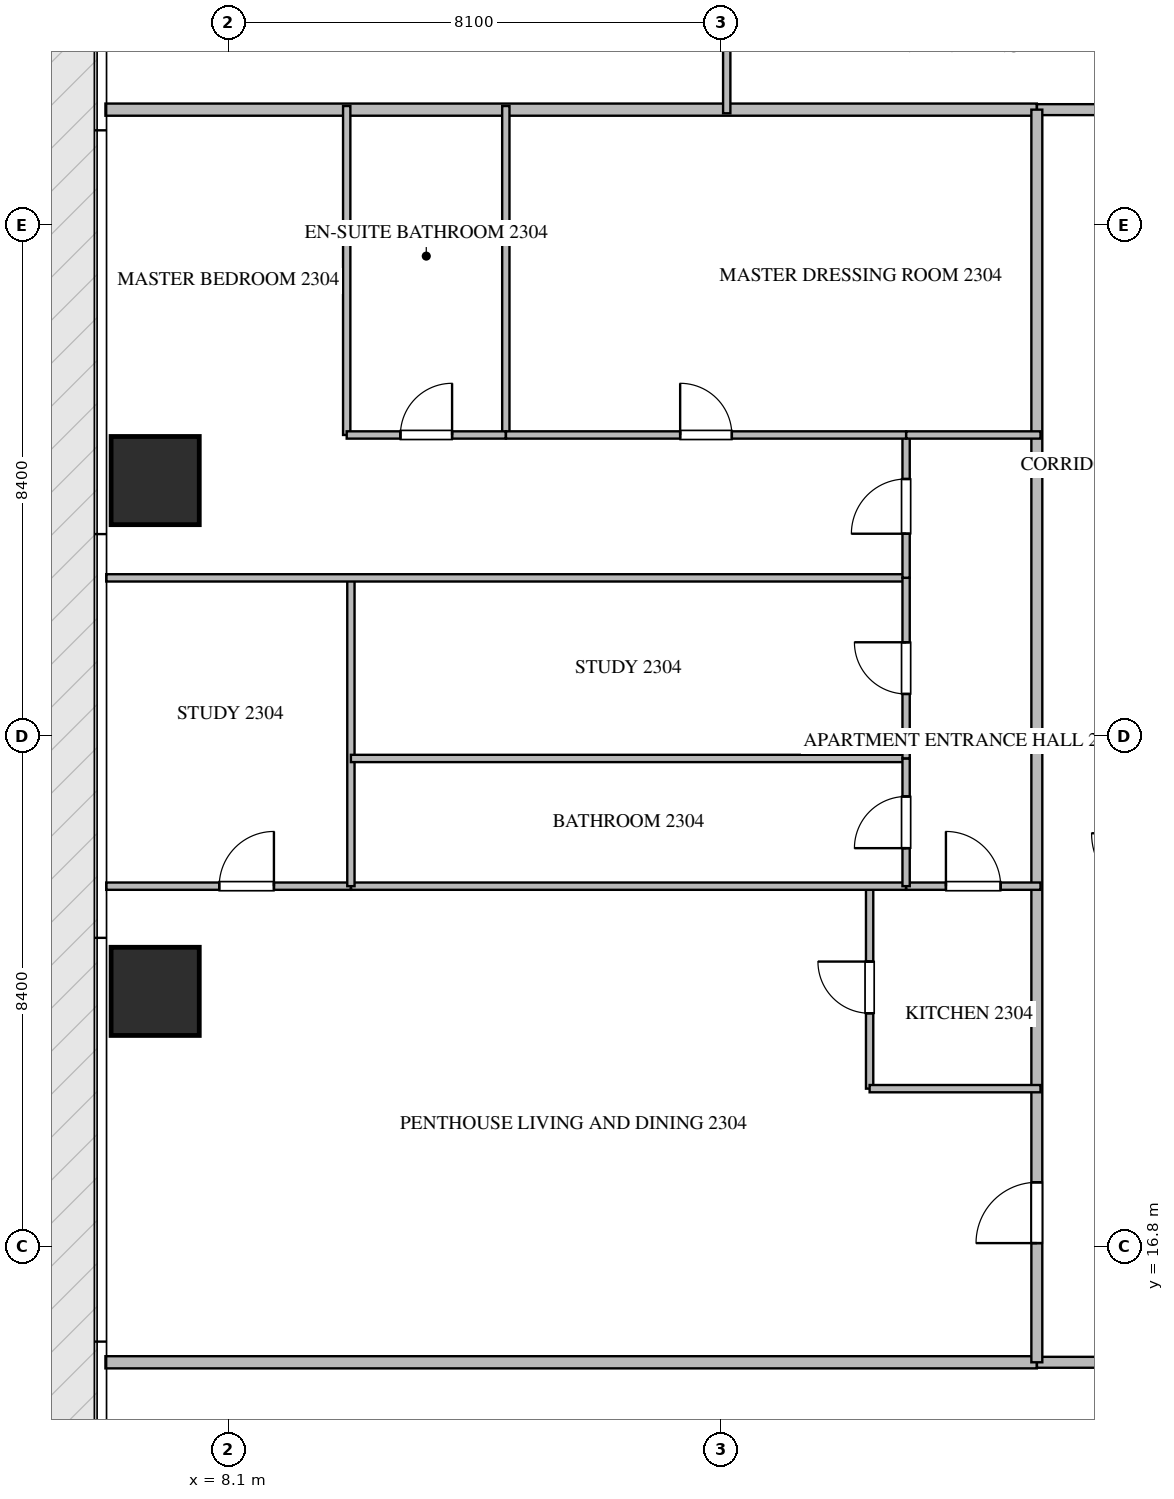
"""IFC4 building model, lengths in metres.
Left out: names, types, materials, properties, quantities, classifications, styles, units other than length and angle.
Written with IfcOpenShell. Run it as: python <this file> out.ifc"""

import sys

from ifc_helpers import new_model, si_unit, direction, frame, frame_2d, origin, origin_2d, place, context, subcontext, project, spatial, rectangle, extrude, source, transform, mapped, element, fill, save


model = new_model("IFC4")
c1 = context("Model", 3, precision=1e-05, world=origin(), true_north=direction((0.0, 1.0)))
c2 = subcontext(c1, "Body", "Model", "MODEL_VIEW")
j1 = project(units=[si_unit("LENGTHUNIT", "METRE"), si_unit("PLANEANGLEUNIT", "RADIAN")], contexts=[c1])
p1 = place(None, origin())
s1 = spatial("IfcSite", under=j1, at=p1, CompositionType="ELEMENT")
p2 = place(p1, origin())
s2 = spatial("IfcBuilding", under=s1, at=p2, CompositionType="ELEMENT")
p3 = place(p2, frame((0.0, 0.0, 94.2)))
s3 = spatial("IfcBuildingStorey", under=s2, at=p3, CompositionType="ELEMENT", Elevation=94.2)
m1 = source(origin(), c2, "Body", "SweptSolid", [
    extrude(rectangle(XDim=1.45, YDim=1.45, at=origin_2d()), origin(), (0.0, 0.0, 1.0), 3.75),
])
for number, where, z_axis, x_axis in (
    (1, (6.9, 21.0, -0.26), (0.0, 0.0, 1.0), (1.0, 0.0, 0.0)),
    (2, (6.9, 29.4, -0.26), (0.0, 0.0, 1.0), (1.0, 0.0, 0.0)),
):
    element("IfcColumn", number, at=place(p3, frame(where, z_axis=z_axis, x_axis=x_axis)), inside=s3, PredefinedType="COLUMN", context=c2, shape_type="MappedRepresentation", body=[
        mapped(m1, transform((0.0, 0.0, 0.0), scale=1.0)),
    ])
for number, where, z_axis, x_axis in (
    (3, (6.082, 14.9, 0.0), (0.0, 0.0, 1.0), (1.0, 0.0, 0.0)),
    (4, (6.082, 35.5, 0.0), (0.0, 0.0, 1.0), (1.0, 0.0, 0.0)),
):
    element("IfcWall", number, at=place(p3, frame(where, z_axis=z_axis, x_axis=x_axis)), inside=s3, PredefinedType="PARTITIONING", context=c2, shape_type="SweptSolid", body=[
        extrude(rectangle(XDim=15.318, YDim=0.2, at=frame_2d((7.659, 0.0))), origin(), (0.0, 0.0, 1.0), 3.49),
    ])
p4 = place(p3, frame((21.402, 14.9, 0.0), z_axis=(0.0, 0.0, 1.0), x_axis=(1.0, 0.0, 0.0)))
e5 = element("IfcWall", 5, at=p4, inside=s3, PredefinedType="PARTITIONING", context=c2, shape_type="SweptSolid", body=[
    extrude(rectangle(XDim=21.996, YDim=0.18, at=frame_2d((10.998, 0.0))), origin(), (0.0, 0.0, 1.0), 3.49),
])
p5 = place(p4, frame((15.222, 0.0, 0.0)))
e6 = element("IfcOpeningElement", 6, at=p5, cuts=e5, PredefinedType="OPENING", context=c2, shape_type="SweptSolid", body=[
    extrude(rectangle(XDim=1.0, YDim=2.15, at=frame_2d((0.5, 1.075))), frame((0.0, 0.1, 0.0), z_axis=(0.0, -1.0, 0.0), x_axis=(1.0, 0.0, 0.0)), (0.0, 0.0, 1.0), 0.2),
])
p6 = place(p3, frame((21.402, 35.5, 0.0), z_axis=(0.0, 0.0, 1.0), x_axis=(1.0, 0.0, 0.0)))
e7 = element("IfcWall", 7, at=p6, inside=s3, PredefinedType="PARTITIONING", context=c2, shape_type="SweptSolid", body=[
    extrude(rectangle(XDim=21.996, YDim=0.18, at=frame_2d((10.998, 0.0))), origin(), (0.0, 0.0, 1.0), 3.49),
])
p7 = place(p6, frame((7.454, 0.0, 0.0)))
e8 = element("IfcOpeningElement", 8, at=p7, cuts=e7, PredefinedType="OPENING", context=c2, shape_type="SweptSolid", body=[
    extrude(rectangle(XDim=1.0, YDim=2.15, at=frame_2d((0.5, 1.075))), frame((0.0, 0.1, 0.0), z_axis=(0.0, -1.0, 0.0), x_axis=(1.0, 0.0, 0.0)), (0.0, 0.0, 1.0), 0.2),
])
p8 = place(p6, frame((13.542, 0.0, 0.0)))
e9 = element("IfcOpeningElement", 9, at=p8, cuts=e7, PredefinedType="OPENING", context=c2, shape_type="SweptSolid", body=[
    extrude(rectangle(XDim=1.0, YDim=2.15, at=frame_2d((0.5, 1.075))), frame((0.0, 0.1, 0.0), z_axis=(0.0, -1.0, 0.0), x_axis=(1.0, 0.0, 0.0)), (0.0, 0.0, 1.0), 0.2),
])
p9 = place(p3, frame((21.4, 14.9, 0.0), z_axis=(0.0, 0.0, 1.0), x_axis=(0.0, 1.0, 0.0)))
e10 = element("IfcWall", 10, at=p9, inside=s3, PredefinedType="PARTITIONING", context=c2, shape_type="SweptSolid", body=[
    extrude(rectangle(XDim=20.6, YDim=0.18, at=frame_2d((10.3, 0.0))), origin(), (0.0, 0.0, 1.0), 3.49),
])
p10 = place(p9, frame((1.96, 0.0, 0.0)))
e11 = element("IfcOpeningElement", 11, at=p10, cuts=e10, PredefinedType="OPENING", context=c2, shape_type="SweptSolid", body=[
    extrude(rectangle(XDim=1.0, YDim=2.15, at=frame_2d((0.5, 1.075))), frame((0.0, 0.1, 0.0), z_axis=(0.0, -1.0, 0.0), x_axis=(1.0, 0.0, 0.0)), (0.0, 0.0, 1.0), 0.2),
])
p11 = place(p3, frame((16.3, 37.648, 0.0), z_axis=(0.0, 0.0, 1.0), x_axis=(0.0, -1.0, 0.0)))
e12 = element("IfcWall", 12, at=p11, inside=s3, PredefinedType="PARTITIONING", context=c2, shape_type="SweptSolid", body=[
    extrude(rectangle(XDim=2.208, YDim=0.12, at=frame_2d((1.104, 0.0))), origin(), (0.0, 0.0, 1.0), 3.49),
])
p12 = place(p3, frame((18.65, 19.4, 0.0), z_axis=(0.0, 0.0, 1.0), x_axis=(0.0, 1.0, 0.0)))
e13 = element("IfcWall", 13, at=p12, inside=s3, PredefinedType="PARTITIONING", context=c2, shape_type="SweptSolid", body=[
    extrude(rectangle(XDim=3.33, YDim=0.12, at=frame_2d((1.665, 0.0))), origin(), (0.0, 0.0, 1.0), 3.49),
])
p13 = place(p12, frame((1.24, 0.0, 0.0)))
e14 = element("IfcOpeningElement", 14, at=p13, cuts=e13, PredefinedType="OPENING", context=c2, shape_type="SweptSolid", body=[
    extrude(rectangle(XDim=0.85, YDim=2.1, at=frame_2d((0.425, 1.05))), frame((0.0, 0.07, 0.0), z_axis=(0.0, -1.0, 0.0), x_axis=(1.0, 0.0, 0.0)), (0.0, 0.0, 1.0), 0.14),
])
p14 = place(p3, frame((18.65, 19.4, 0.0), z_axis=(0.0, 0.0, 1.0), x_axis=(1.0, 0.0, 0.0)))
e15 = element("IfcWall", 15, at=p14, inside=s3, PredefinedType="PARTITIONING", context=c2, shape_type="SweptSolid", body=[
    extrude(rectangle(XDim=2.81, YDim=0.12, at=frame_2d((1.405, 0.0))), origin(), (0.0, 0.0, 1.0), 3.49),
])
p15 = place(p3, frame((19.25, 22.73, 0.0), z_axis=(0.0, 0.0, 1.0), x_axis=(1.0, 0.0, 0.0)))
e16 = element("IfcWall", 16, at=p15, inside=s3, PredefinedType="PARTITIONING", context=c2, shape_type="SweptSolid", body=[
    extrude(rectangle(XDim=2.21, YDim=0.12, at=frame_2d((1.105, 0.0))), origin(), (0.0, 0.0, 1.0), 3.49),
])
p16 = place(p15, frame((0.655, 0.0, 0.0)))
e17 = element("IfcOpeningElement", 17, at=p16, cuts=e16, PredefinedType="OPENING", context=c2, shape_type="SweptSolid", body=[
    extrude(rectangle(XDim=0.9, YDim=2.1, at=frame_2d((0.45, 1.05))), frame((0.0, 0.07, 0.0), z_axis=(0.0, -1.0, 0.0), x_axis=(1.0, 0.0, 0.0)), (0.0, 0.0, 1.0), 0.14),
])
p17 = place(p3, frame((6.095, 22.73, 0.0), z_axis=(0.0, 0.0, 1.0), x_axis=(1.0, 0.0, 0.0)))
e18 = element("IfcWall", 18, at=p17, inside=s3, PredefinedType="PARTITIONING", context=c2, shape_type="SweptSolid", body=[
    extrude(rectangle(XDim=4.024, YDim=0.12, at=frame_2d((2.012, 0.0))), origin(), (0.0, 0.0, 1.0), 3.49),
])
p18 = place(p17, frame((1.858, 0.0, 0.0)))
e19 = element("IfcOpeningElement", 19, at=p18, cuts=e18, PredefinedType="OPENING", context=c2, shape_type="SweptSolid", body=[
    extrude(rectangle(XDim=0.9, YDim=2.1, at=frame_2d((0.45, 1.05))), frame((0.0, 0.07, 0.0), z_axis=(0.0, -1.0, 0.0), x_axis=(1.0, 0.0, 0.0)), (0.0, 0.0, 1.0), 0.14),
])
p19 = place(p3, frame((10.121, 22.73, 0.0), z_axis=(0.0, 0.0, 1.0), x_axis=(1.0, 0.0, 0.0)))
e20 = element("IfcWall", 20, at=p19, inside=s3, PredefinedType="PARTITIONING", context=c2, shape_type="SweptSolid", body=[
    extrude(rectangle(XDim=9.127, YDim=0.12, at=frame_2d((4.563, 0.0))), origin(), (0.0, 0.0, 1.0), 3.49),
])
p20 = place(p3, frame((10.119, 22.73, 0.0), z_axis=(0.0, 0.0, 1.0), x_axis=(0.0, 1.0, 0.0)))
e21 = element("IfcWall", 21, at=p20, inside=s3, PredefinedType="PARTITIONING", context=c2, shape_type="SweptSolid", body=[
    extrude(rectangle(XDim=5.07, YDim=0.12, at=frame_2d((2.535, 0.0))), origin(), (0.0, 0.0, 1.0), 3.49),
])
p21 = place(p3, frame((6.095, 27.8, 0.0), z_axis=(0.0, 0.0, 1.0), x_axis=(1.0, 0.0, 0.0)))
e22 = element("IfcWall", 22, at=p21, inside=s3, PredefinedType="PARTITIONING", context=c2, shape_type="SweptSolid", body=[
    extrude(rectangle(XDim=13.155, YDim=0.12, at=frame_2d((6.578, 0.0))), origin(), (0.0, 0.0, 1.0), 3.49),
])
p22 = place(p3, frame((10.119, 24.83, 0.0), z_axis=(0.0, 0.0, 1.0), x_axis=(1.0, 0.0, 0.0)))
e23 = element("IfcWall", 23, at=p22, inside=s3, PredefinedType="PARTITIONING", context=c2, shape_type="SweptSolid", body=[
    extrude(rectangle(XDim=9.131, YDim=0.12, at=frame_2d((4.565, 0.0))), origin(), (0.0, 0.0, 1.0), 3.49),
])
p23 = place(p3, frame((19.25, 22.73, 0.0), z_axis=(0.0, 0.0, 1.0), x_axis=(0.0, 1.0, 0.0)))
e24 = element("IfcWall", 24, at=p23, inside=s3, PredefinedType="PARTITIONING", context=c2, shape_type="SweptSolid", body=[
    extrude(rectangle(XDim=2.1, YDim=0.12, at=frame_2d((1.05, 0.0))), origin(), (0.0, 0.0, 1.0), 3.49),
])
p24 = place(p23, frame((0.625, 0.0, 0.0)))
e25 = element("IfcOpeningElement", 25, at=p24, cuts=e24, PredefinedType="OPENING", context=c2, shape_type="SweptSolid", body=[
    extrude(rectangle(XDim=0.85, YDim=2.1, at=frame_2d((0.425, 1.05))), frame((0.0, 0.07, 0.0), z_axis=(0.0, -1.0, 0.0), x_axis=(1.0, 0.0, 0.0)), (0.0, 0.0, 1.0), 0.14),
])
p25 = place(p3, frame((19.25, 24.832, 0.0), z_axis=(0.0, 0.0, 1.0), x_axis=(0.0, 1.0, 0.0)))
e26 = element("IfcWall", 26, at=p25, inside=s3, PredefinedType="PARTITIONING", context=c2, shape_type="SweptSolid", body=[
    extrude(rectangle(XDim=2.968, YDim=0.12, at=frame_2d((1.484, 0.0))), origin(), (0.0, 0.0, 1.0), 3.49),
])
p26 = place(p25, frame((1.059, 0.0, 0.0)))
e27 = element("IfcOpeningElement", 27, at=p26, cuts=e26, PredefinedType="OPENING", context=c2, shape_type="SweptSolid", body=[
    extrude(rectangle(XDim=0.85, YDim=2.1, at=frame_2d((0.425, 1.05))), frame((0.0, 0.07, 0.0), z_axis=(0.0, -1.0, 0.0), x_axis=(1.0, 0.0, 0.0)), (0.0, 0.0, 1.0), 0.14),
])
p27 = place(p3, frame((19.25, 27.802, 0.0), z_axis=(0.0, 0.0, 1.0), x_axis=(0.0, 1.0, 0.0)))
e28 = element("IfcWall", 28, at=p27, inside=s3, PredefinedType="PARTITIONING", context=c2, shape_type="SweptSolid", body=[
    extrude(rectangle(XDim=2.348, YDim=0.12, at=frame_2d((1.174, 0.0))), origin(), (0.0, 0.0, 1.0), 3.49),
])
p28 = place(p27, frame((0.724, 0.0, 0.0)))
e29 = element("IfcOpeningElement", 29, at=p28, cuts=e28, PredefinedType="OPENING", context=c2, shape_type="SweptSolid", body=[
    extrude(rectangle(XDim=0.9, YDim=2.1, at=frame_2d((0.45, 1.05))), frame((0.0, 0.07, 0.0), z_axis=(0.0, -1.0, 0.0), x_axis=(1.0, 0.0, 0.0)), (0.0, 0.0, 1.0), 0.14),
])
for number, where, z_axis, x_axis in (
    (30, (10.05, 30.15, 0.0), (0.0, 0.0, 1.0), (0.0, 1.0, 0.0)),
    (31, (12.667, 30.15, 0.0), (0.0, 0.0, 1.0), (0.0, 1.0, 0.0)),
):
    element("IfcWall", number, at=place(p3, frame(where, z_axis=z_axis, x_axis=x_axis)), inside=s3, PredefinedType="PARTITIONING", context=c2, shape_type="SweptSolid", body=[
        extrude(rectangle(XDim=5.41, YDim=0.12, at=frame_2d((2.705, 0.0))), origin(), (0.0, 0.0, 1.0), 3.49),
    ])
p29 = place(p3, frame((10.05, 30.15, 0.0), z_axis=(0.0, 0.0, 1.0), x_axis=(1.0, 0.0, 0.0)))
e32 = element("IfcWall", 32, at=p29, inside=s3, PredefinedType="PARTITIONING", context=c2, shape_type="SweptSolid", body=[
    extrude(rectangle(XDim=2.617, YDim=0.12, at=frame_2d((1.309, 0.0))), origin(), (0.0, 0.0, 1.0), 3.49),
])
p30 = place(p29, frame((0.883, 0.0, 0.0)))
e33 = element("IfcOpeningElement", 33, at=p30, cuts=e32, PredefinedType="OPENING", context=c2, shape_type="SweptSolid", body=[
    extrude(rectangle(XDim=0.85, YDim=2.1, at=frame_2d((0.425, 1.05))), frame((0.0, 0.07, 0.0), z_axis=(0.0, -1.0, 0.0), x_axis=(1.0, 0.0, 0.0)), (0.0, 0.0, 1.0), 0.14),
])
p31 = place(p3, frame((12.669, 30.15, 0.0), z_axis=(0.0, 0.0, 1.0), x_axis=(1.0, 0.0, 0.0)))
e34 = element("IfcWall", 34, at=p31, inside=s3, PredefinedType="PARTITIONING", context=c2, shape_type="SweptSolid", body=[
    extrude(rectangle(XDim=6.581, YDim=0.12, at=frame_2d((3.291, 0.0))), origin(), (0.0, 0.0, 1.0), 3.49),
])
p32 = place(p31, frame((2.865, 0.0, 0.0)))
e35 = element("IfcOpeningElement", 35, at=p32, cuts=e34, PredefinedType="OPENING", context=c2, shape_type="SweptSolid", body=[
    extrude(rectangle(XDim=0.85, YDim=2.1, at=frame_2d((0.425, 1.05))), frame((0.0, 0.07, 0.0), z_axis=(0.0, -1.0, 0.0), x_axis=(1.0, 0.0, 0.0)), (0.0, 0.0, 1.0), 0.14),
])
p33 = place(p3, frame((19.252, 30.15, 0.0), z_axis=(0.0, 0.0, 1.0), x_axis=(1.0, 0.0, 0.0)))
e36 = element("IfcWall", 36, at=p33, inside=s3, PredefinedType="PARTITIONING", context=c2, shape_type="SweptSolid", body=[
    extrude(rectangle(XDim=2.208, YDim=0.12, at=frame_2d((1.104, 0.0))), origin(), (0.0, 0.0, 1.0), 3.49),
])
m2 = source(origin(), c2, "Body", "SweptSolid", [
    extrude(rectangle(XDim=1.0, YDim=2.15, at=frame_2d((0.5, 1.075))), frame((0.0, 0.025, 0.0), z_axis=(0.0, -1.0, 0.0), x_axis=(1.0, 0.0, 0.0)), (0.0, 0.0, 1.0), 0.05),
])
p34 = place(p10, origin())
e37 = element("IfcDoor", 37, at=p34, inside=s3, OperationType="SINGLE_SWING_LEFT", PredefinedType="DOOR", context=c2, shape_type="MappedRepresentation", body=[
    mapped(m2, transform((0.0, 0.0, 0.0), scale=1.0)),
])
fill(e11, e37)
m3 = source(origin(), c2, "Body", "SweptSolid", [
    extrude(rectangle(XDim=0.85, YDim=2.1, at=frame_2d((0.425, 1.05))), frame((0.0, 0.025, 0.0), z_axis=(0.0, -1.0, 0.0), x_axis=(1.0, 0.0, 0.0)), (0.0, 0.0, 1.0), 0.05),
])
p35 = place(p13, origin())
e38 = element("IfcDoor", 38, at=p35, inside=s3, OperationType="SINGLE_SWING_RIGHT", PredefinedType="DOOR", context=c2, shape_type="MappedRepresentation", body=[
    mapped(m3, transform((0.0, 0.0, 0.0), scale=1.0)),
])
fill(e14, e38)
m4 = source(origin(), c2, "Body", "SweptSolid", [
    extrude(rectangle(XDim=0.9, YDim=2.1, at=frame_2d((0.45, 1.05))), frame((0.0, 0.025, 0.0), z_axis=(0.0, -1.0, 0.0), x_axis=(1.0, 0.0, 0.0)), (0.0, 0.0, 1.0), 0.05),
])
p36 = place(p16, origin())
e39 = element("IfcDoor", 39, at=p36, inside=s3, OperationType="SINGLE_SWING_LEFT", PredefinedType="DOOR", context=c2, shape_type="MappedRepresentation", body=[
    mapped(m4, transform((0.0, 0.0, 0.0), scale=1.0)),
])
fill(e17, e39)
p37 = place(p18, origin())
e40 = element("IfcDoor", 40, at=p37, inside=s3, OperationType="SINGLE_SWING_RIGHT", PredefinedType="DOOR", context=c2, shape_type="MappedRepresentation", body=[
    mapped(m4, transform((0.0, 0.0, 0.0), scale=1.0)),
])
fill(e19, e40)
p38 = place(p24, origin())
e41 = element("IfcDoor", 41, at=p38, inside=s3, OperationType="SINGLE_SWING_LEFT", PredefinedType="DOOR", context=c2, shape_type="MappedRepresentation", body=[
    mapped(m3, transform((0.0, 0.0, 0.0), scale=1.0)),
])
fill(e25, e41)
p39 = place(p26, origin())
e42 = element("IfcDoor", 42, at=p39, inside=s3, OperationType="SINGLE_SWING_RIGHT", PredefinedType="DOOR", context=c2, shape_type="MappedRepresentation", body=[
    mapped(m3, transform((0.0, 0.0, 0.0), scale=1.0)),
])
fill(e27, e42)
p40 = place(p28, origin())
e43 = element("IfcDoor", 43, at=p40, inside=s3, OperationType="SINGLE_SWING_LEFT", PredefinedType="DOOR", context=c2, shape_type="MappedRepresentation", body=[
    mapped(m4, transform((0.0, 0.0, 0.0), scale=1.0)),
])
fill(e29, e43)
p41 = place(p30, origin())
e44 = element("IfcDoor", 44, at=p41, inside=s3, OperationType="SINGLE_SWING_RIGHT", PredefinedType="DOOR", context=c2, shape_type="MappedRepresentation", body=[
    mapped(m3, transform((0.0, 0.0, 0.0), scale=1.0)),
])
fill(e33, e44)
p42 = place(p32, origin())
e45 = element("IfcDoor", 45, at=p42, inside=s3, OperationType="SINGLE_SWING_LEFT", PredefinedType="DOOR", context=c2, shape_type="MappedRepresentation", body=[
    mapped(m3, transform((0.0, 0.0, 0.0), scale=1.0)),
])
fill(e35, e45)
save(model, sys.argv[1])
